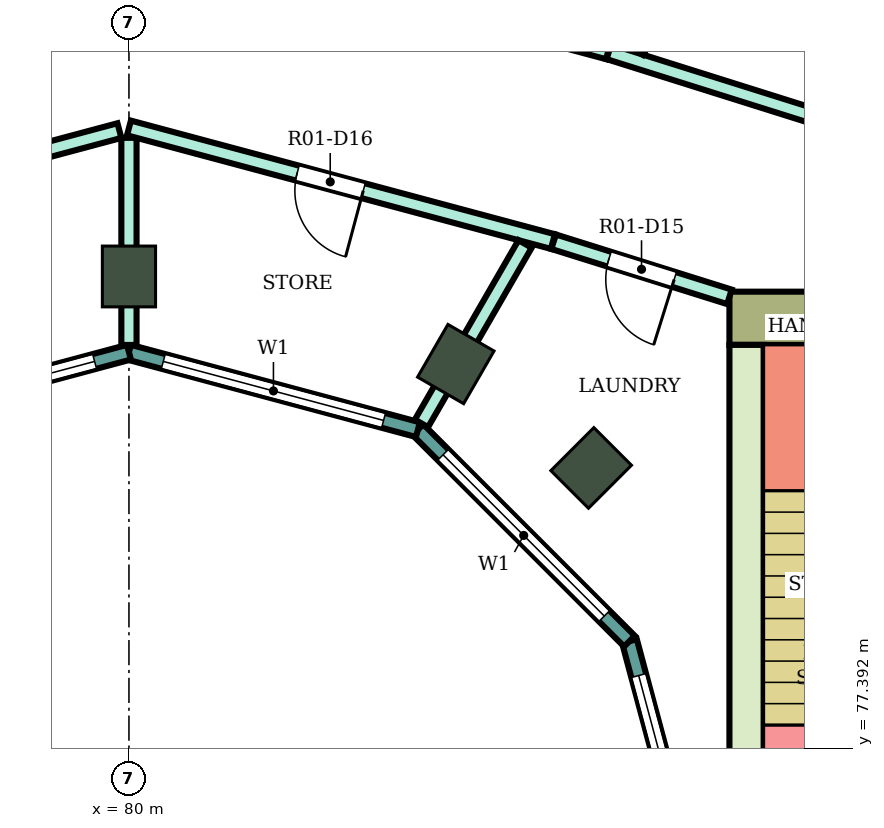
"""IFC4 building model, lengths in metres.
Left out: names, types, materials, properties, quantities, classifications, styles, units other than length and angle.
Written with IfcOpenShell. Run it as: python <this file> out.ifc"""

import sys

from ifc_helpers import new_model, si_unit, direction, frame, frame_2d, origin, origin_2d, place, context, subcontext, project, spatial, rectangle, extrude, element, fill, save


model = new_model("IFC4")
c1 = context("Model", 3, precision=1e-05, world=origin(), true_north=direction((0.0, 1.0)))
c2 = subcontext(c1, "Body", "Model", "MODEL_VIEW")
j1 = project(units=[si_unit("LENGTHUNIT", "METRE"), si_unit("PLANEANGLEUNIT", "RADIAN")], contexts=[c1])
p1 = place(None, origin())
s1 = spatial("IfcSite", under=j1, at=p1, CompositionType="ELEMENT")
p2 = place(p1, origin())
s2 = spatial("IfcBuilding", under=s1, at=p2, CompositionType="ELEMENT")
p3 = place(p2, frame((0.0, 0.0, 161.8)))
s3 = spatial("IfcBuildingStorey", under=s2, at=p3, CompositionType="ELEMENT", Elevation=161.8)
for number, where, z_axis, x_axis in (
    (1, (86.081, 81.081, 0.0), (0.0, 0.0, 1.0), (0.707, 0.707, 0.0)),
    (2, (84.3, 82.448, 0.0), (0.0, 0.0, 1.0), (0.5, 0.866, 0.0)),
    (3, (80.0, 83.6, 0.0), (0.0, 0.0, 1.0), (0.0, 1.0, 0.0)),
):
    element("IfcColumn", number, at=place(p3, frame(where, z_axis=z_axis, x_axis=x_axis)), inside=s3, PredefinedType="COLUMN", context=c2, shape_type="SweptSolid", body=[
        extrude(rectangle(XDim=0.8, YDim=0.7, at=origin_2d()), origin(), (0.0, 0.0, 1.0), 4.1),
    ])
p4 = place(p3, frame((87.9, 83.05, 0.0), z_axis=(0.0, 0.0, 1.0), x_axis=(1.0, 0.0, 0.0)))
e4 = element("IfcWall", 4, at=p4, inside=s3, PredefinedType="SHEAR", context=c2, shape_type="SweptSolid", body=[
    extrude(rectangle(XDim=14.8, YDim=0.7, at=frame_2d((7.4, 0.0))), origin(), (0.0, 0.0, 1.0), 3.78),
])
p5 = place(p4, frame((4.2, 0.0, 0.0)))
e5 = element("IfcOpeningElement", 5, at=p5, cuts=e4, PredefinedType="OPENING", context=c2, shape_type="SweptSolid", body=[
    extrude(rectangle(XDim=2.4, YDim=2.4, at=frame_2d((1.2, 1.2))), frame((0.0, 0.36, 0.0), z_axis=(0.0, -1.0, 0.0), x_axis=(1.0, 0.0, 0.0)), (0.0, 0.0, 1.0), 0.72),
])
p6 = place(p3, frame((88.125, 75.0, 0.0), z_axis=(0.0, 0.0, 1.0), x_axis=(0.0, 1.0, 0.0)))
e6 = element("IfcWall", 6, at=p6, inside=s3, PredefinedType="SHEAR", context=c2, shape_type="SweptSolid", body=[
    extrude(rectangle(XDim=7.7, YDim=0.45, at=frame_2d((3.85, 0.0))), origin(), (0.0, 0.0, 1.0), 3.78),
])
p7 = place(p3, frame((87.604, 75.0, 0.0), z_axis=(0.0, 0.0, 1.0), x_axis=(-0.258789828301, 0.965933654434, 0.0)))
e7 = element("IfcWall", 7, at=p7, inside=s3, PredefinedType="NOTDEFINED", context=c2, shape_type="SweptSolid", body=[
    extrude(rectangle(XDim=3.936, YDim=0.2, at=frame_2d((1.968, 0.0))), origin(), (0.0, 0.0, 1.0), 4.1),
])
p8 = place(p7, frame((0.468, 0.0, 0.9)))
e8 = element("IfcOpeningElement", 8, at=p8, cuts=e7, PredefinedType="OPENING", context=c2, shape_type="SweptSolid", body=[
    extrude(rectangle(XDim=3.0, YDim=2.3, at=frame_2d((1.5, 1.15))), frame((0.0, 0.11, 0.0), z_axis=(0.0, -1.0, 0.0), x_axis=(1.0, 0.0, 0.0)), (0.0, 0.0, 1.0), 0.22),
])
p9 = place(p3, frame((86.585, 78.802, 0.0), z_axis=(0.0, 0.0, 1.0), x_axis=(-0.707106781187, 0.707106781187, 0.0)))
e9 = element("IfcWall", 9, at=p9, inside=s3, PredefinedType="NOTDEFINED", context=c2, shape_type="SweptSolid", body=[
    extrude(rectangle(XDim=3.936, YDim=0.2, at=frame_2d((1.968, 0.0))), origin(), (0.0, 0.0, 1.0), 4.1),
])
p10 = place(p9, frame((0.468, 0.0, 0.9)))
e10 = element("IfcOpeningElement", 10, at=p10, cuts=e9, PredefinedType="OPENING", context=c2, shape_type="SweptSolid", body=[
    extrude(rectangle(XDim=3.0, YDim=2.3, at=frame_2d((1.5, 1.15))), frame((0.0, 0.11, 0.0), z_axis=(0.0, -1.0, 0.0), x_axis=(1.0, 0.0, 0.0)), (0.0, 0.0, 1.0), 0.22),
])
p11 = place(p3, frame((83.802, 81.585, 0.0), z_axis=(0.0, 0.0, 1.0), x_axis=(-0.965933654434, 0.258789828301, 0.0)))
e11 = element("IfcWall", 11, at=p11, inside=s3, PredefinedType="NOTDEFINED", context=c2, shape_type="SweptSolid", body=[
    extrude(rectangle(XDim=3.936, YDim=0.2, at=frame_2d((1.968, 0.0))), origin(), (0.0, 0.0, 1.0), 4.1),
])
p12 = place(p11, frame((0.468, 0.0, 0.9)))
e12 = element("IfcOpeningElement", 12, at=p12, cuts=e11, PredefinedType="OPENING", context=c2, shape_type="SweptSolid", body=[
    extrude(rectangle(XDim=3.0, YDim=2.3, at=frame_2d((1.5, 1.15))), frame((0.0, 0.11, 0.0), z_axis=(0.0, -1.0, 0.0), x_axis=(1.0, 0.0, 0.0)), (0.0, 0.0, 1.0), 0.22),
])
p13 = place(p3, frame((80.0, 82.604, 0.0), z_axis=(0.0, 0.0, 1.0), x_axis=(-0.965933654434, -0.258789828301, 0.0)))
e13 = element("IfcWall", 13, at=p13, inside=s3, PredefinedType="NOTDEFINED", context=c2, shape_type="SweptSolid", body=[
    extrude(rectangle(XDim=3.936, YDim=0.2, at=frame_2d((1.968, 0.0))), origin(), (0.0, 0.0, 1.0), 4.1),
])
p14 = place(p13, frame((0.468, 0.0, 0.9)))
e14 = element("IfcOpeningElement", 14, at=p14, cuts=e13, PredefinedType="OPENING", context=c2, shape_type="SweptSolid", body=[
    extrude(rectangle(XDim=3.0, YDim=2.3, at=frame_2d((1.5, 1.15))), frame((0.0, 0.11, 0.0), z_axis=(0.0, -1.0, 0.0), x_axis=(1.0, 0.0, 0.0)), (0.0, 0.0, 1.0), 0.22),
])
p15 = place(p3, frame((73.687, 86.554, 0.0), z_axis=(0.0, 0.0, 1.0), x_axis=(0.965999420828, 0.258544230182, 0.0)))
e15 = element("IfcWall", 15, at=p15, inside=s3, PredefinedType="PARTITIONING", context=c2, shape_type="SweptSolid", body=[
    extrude(rectangle(XDim=6.446, YDim=0.2, at=frame_2d((3.223, 0.0))), origin(), (0.0, 0.0, 1.0), 3.65),
])
p16 = place(p15, frame((3.638, 0.0, 0.0)))
e16 = element("IfcOpeningElement", 16, at=p16, cuts=e15, PredefinedType="OPENING", context=c2, shape_type="SweptSolid", body=[
    extrude(rectangle(XDim=1.0, YDim=2.1, at=frame_2d((0.5, 1.05))), frame((0.0, 0.11, 0.0), z_axis=(0.0, -1.0, 0.0), x_axis=(1.0, 0.0, 0.0)), (0.0, 0.0, 1.0), 0.22),
])
p17 = place(p3, frame((74.413, 84.057, 0.0), z_axis=(0.0, 0.0, 1.0), x_axis=(0.965972135939, 0.258646153246, 0.0)))
e17 = element("IfcWall", 17, at=p17, inside=s3, PredefinedType="PARTITIONING", context=c2, shape_type="SweptSolid", body=[
    extrude(rectangle(XDim=5.654, YDim=0.2, at=frame_2d((2.827, 0.0))), origin(), (0.0, 0.0, 1.0), 3.65),
])
p18 = place(p17, frame((2.593, 0.0, 0.0)))
e18 = element("IfcOpeningElement", 18, at=p18, cuts=e17, PredefinedType="OPENING", context=c2, shape_type="SweptSolid", body=[
    extrude(rectangle(XDim=0.9, YDim=2.1, at=frame_2d((0.45, 1.05))), frame((0.0, 0.11, 0.0), z_axis=(0.0, -1.0, 0.0), x_axis=(1.0, 0.0, 0.0)), (0.0, 0.0, 1.0), 0.22),
])
p19 = place(p3, frame((80.0, 82.699, 0.0), z_axis=(0.0, 0.0, 1.0), x_axis=(0.0, 1.0, 0.0)))
e19 = element("IfcWall", 19, at=p19, inside=s3, PredefinedType="PARTITIONING", context=c2, shape_type="SweptSolid", body=[
    extrude(rectangle(XDim=2.725, YDim=0.2, at=frame_2d((1.363, 0.0))), origin(), (0.0, 0.0, 1.0), 3.65),
])
p20 = place(p3, frame((80.0, 85.554, 0.0), z_axis=(0.0, 0.0, 1.0), x_axis=(0.965928989968, -0.258807237802, 0.0)))
e20 = element("IfcWall", 20, at=p20, inside=s3, PredefinedType="PARTITIONING", context=c2, shape_type="SweptSolid", body=[
    extrude(rectangle(XDim=5.774, YDim=0.2, at=frame_2d((2.887, 0.0))), origin(), (0.0, 0.0, 1.0), 3.65),
])
p21 = place(p20, frame((2.292, 0.0, 0.0)))
e21 = element("IfcOpeningElement", 21, at=p21, cuts=e20, PredefinedType="OPENING", context=c2, shape_type="SweptSolid", body=[
    extrude(rectangle(XDim=0.9, YDim=2.1, at=frame_2d((0.45, 1.05))), frame((0.0, 0.11, 0.0), z_axis=(0.0, -1.0, 0.0), x_axis=(1.0, 0.0, 0.0)), (0.0, 0.0, 1.0), 0.22),
])
p22 = place(p3, frame((80.087, 88.223, 0.0), z_axis=(0.0, 0.0, 1.0), x_axis=(0.965852330757, -0.25909317855, 0.0)))
e22 = element("IfcWall", 22, at=p22, inside=s3, PredefinedType="PARTITIONING", context=c2, shape_type="SweptSolid", body=[
    extrude(rectangle(XDim=6.436, YDim=0.2, at=frame_2d((3.218, 0.0))), origin(), (0.0, 0.0, 1.0), 3.65),
])
p23 = place(p22, frame((2.678, 0.0, 0.0)))
e23 = element("IfcOpeningElement", 23, at=p23, cuts=e22, PredefinedType="OPENING", context=c2, shape_type="SweptSolid", body=[
    extrude(rectangle(XDim=1.0, YDim=2.1, at=frame_2d((0.5, 1.05))), frame((0.0, 0.11, 0.0), z_axis=(0.0, -1.0, 0.0), x_axis=(1.0, 0.0, 0.0)), (0.0, 0.0, 1.0), 0.22),
])
p24 = place(p3, frame((83.848, 81.667, 0.0), z_axis=(0.0, 0.0, 1.0), x_axis=(0.500185068774, 0.865918527909, 0.0)))
e24 = element("IfcWall", 24, at=p24, inside=s3, PredefinedType="PARTITIONING", context=c2, shape_type="SweptSolid", body=[
    extrude(rectangle(XDim=2.726, YDim=0.2, at=frame_2d((1.363, 0.0))), origin(), (0.0, 0.0, 1.0), 3.65),
])
p25 = place(p3, frame((85.587, 84.057, 0.0), z_axis=(0.0, 0.0, 1.0), x_axis=(0.954239513179, -0.299043393987, 0.0)))
e25 = element("IfcWall", 25, at=p25, inside=s3, PredefinedType="PARTITIONING", context=c2, shape_type="SweptSolid", body=[
    extrude(rectangle(XDim=2.424, YDim=0.2, at=frame_2d((1.212, 0.0))), origin(), (0.0, 0.0, 1.0), 3.65),
])
p26 = place(p25, frame((0.762, 0.0, 0.0)))
e26 = element("IfcOpeningElement", 26, at=p26, cuts=e25, PredefinedType="OPENING", context=c2, shape_type="SweptSolid", body=[
    extrude(rectangle(XDim=0.9, YDim=2.1, at=frame_2d((0.45, 1.05))), frame((0.0, 0.11, 0.0), z_axis=(0.0, -1.0, 0.0), x_axis=(1.0, 0.0, 0.0)), (0.0, 0.0, 1.0), 0.22),
])
p27 = place(p3, frame((86.313, 86.555, 0.0), z_axis=(0.0, 0.0, 1.0), x_axis=(0.953919398959, -0.300062960544, 0.0)))
e27 = element("IfcWall", 27, at=p27, inside=s3, PredefinedType="PARTITIONING", context=c2, shape_type="SweptSolid", body=[
    extrude(rectangle(XDim=5.721, YDim=0.2, at=frame_2d((2.86, 0.0))), origin(), (0.0, 0.0, 1.0), 3.65),
])
p28 = place(p3, frame((86.677, 86.564, 0.0), z_axis=(0.0, 0.0, 1.0), x_axis=(0.500120377296, 0.865955892764, 0.0)))
e28 = element("IfcWall", 28, at=p28, inside=s3, PredefinedType="PARTITIONING", context=c2, shape_type="SweptSolid", body=[
    extrude(rectangle(XDim=12.445, YDim=0.2, at=frame_2d((6.222, 0.0))), origin(), (0.0, 0.0, 1.0), 3.65),
])
p29 = place(p8, origin())
e29 = element("IfcWindow", 29, at=p29, inside=s3, PartitioningType="SINGLE_PANEL", PredefinedType="WINDOW", context=c2, shape_type="SweptSolid", body=[
    extrude(rectangle(XDim=3.0, YDim=2.3, at=frame_2d((1.5, 1.15))), frame((0.0, 0.03, 0.0), z_axis=(0.0, -1.0, 0.0), x_axis=(1.0, 0.0, 0.0)), (0.0, 0.0, 1.0), 0.06),
])
fill(e8, e29)
p30 = place(p10, origin())
e30 = element("IfcWindow", 30, at=p30, inside=s3, PartitioningType="SINGLE_PANEL", PredefinedType="WINDOW", context=c2, shape_type="SweptSolid", body=[
    extrude(rectangle(XDim=3.0, YDim=2.3, at=frame_2d((1.5, 1.15))), frame((0.0, 0.03, 0.0), z_axis=(0.0, -1.0, 0.0), x_axis=(1.0, 0.0, 0.0)), (0.0, 0.0, 1.0), 0.06),
])
fill(e10, e30)
p31 = place(p12, origin())
e31 = element("IfcWindow", 31, at=p31, inside=s3, PartitioningType="SINGLE_PANEL", PredefinedType="WINDOW", context=c2, shape_type="SweptSolid", body=[
    extrude(rectangle(XDim=3.0, YDim=2.3, at=frame_2d((1.5, 1.15))), frame((0.0, 0.03, 0.0), z_axis=(0.0, -1.0, 0.0), x_axis=(1.0, 0.0, 0.0)), (0.0, 0.0, 1.0), 0.06),
])
fill(e12, e31)
p32 = place(p14, origin())
e32 = element("IfcWindow", 32, at=p32, inside=s3, PartitioningType="SINGLE_PANEL", PredefinedType="WINDOW", context=c2, shape_type="SweptSolid", body=[
    extrude(rectangle(XDim=3.0, YDim=2.3, at=frame_2d((1.5, 1.15))), frame((0.0, 0.03, 0.0), z_axis=(0.0, -1.0, 0.0), x_axis=(1.0, 0.0, 0.0)), (0.0, 0.0, 1.0), 0.06),
])
fill(e14, e32)
p33 = place(p26, frame((0.9, 0.0, 0.0), z_axis=(0.0, 0.0, 1.0), x_axis=(-1.0, 0.0, 0.0)))
e33 = element("IfcDoor", 33, at=p33, inside=s3, OperationType="SINGLE_SWING_LEFT", PredefinedType="DOOR", context=c2, shape_type="SweptSolid", body=[
    extrude(rectangle(XDim=0.9, YDim=2.1, at=frame_2d((0.45, 1.05))), frame((0.0, 0.025, 0.0), z_axis=(0.0, -1.0, 0.0), x_axis=(1.0, 0.0, 0.0)), (0.0, 0.0, 1.0), 0.05),
])
fill(e26, e33)
p34 = place(p21, frame((0.9, 0.0, 0.0), z_axis=(0.0, 0.0, 1.0), x_axis=(-1.0, 0.0, 0.0)))
e34 = element("IfcDoor", 34, at=p34, inside=s3, OperationType="SINGLE_SWING_LEFT", PredefinedType="DOOR", context=c2, shape_type="SweptSolid", body=[
    extrude(rectangle(XDim=0.9, YDim=2.1, at=frame_2d((0.45, 1.05))), frame((0.0, 0.025, 0.0), z_axis=(0.0, -1.0, 0.0), x_axis=(1.0, 0.0, 0.0)), (0.0, 0.0, 1.0), 0.05),
])
fill(e21, e34)
save(model, sys.argv[1])
